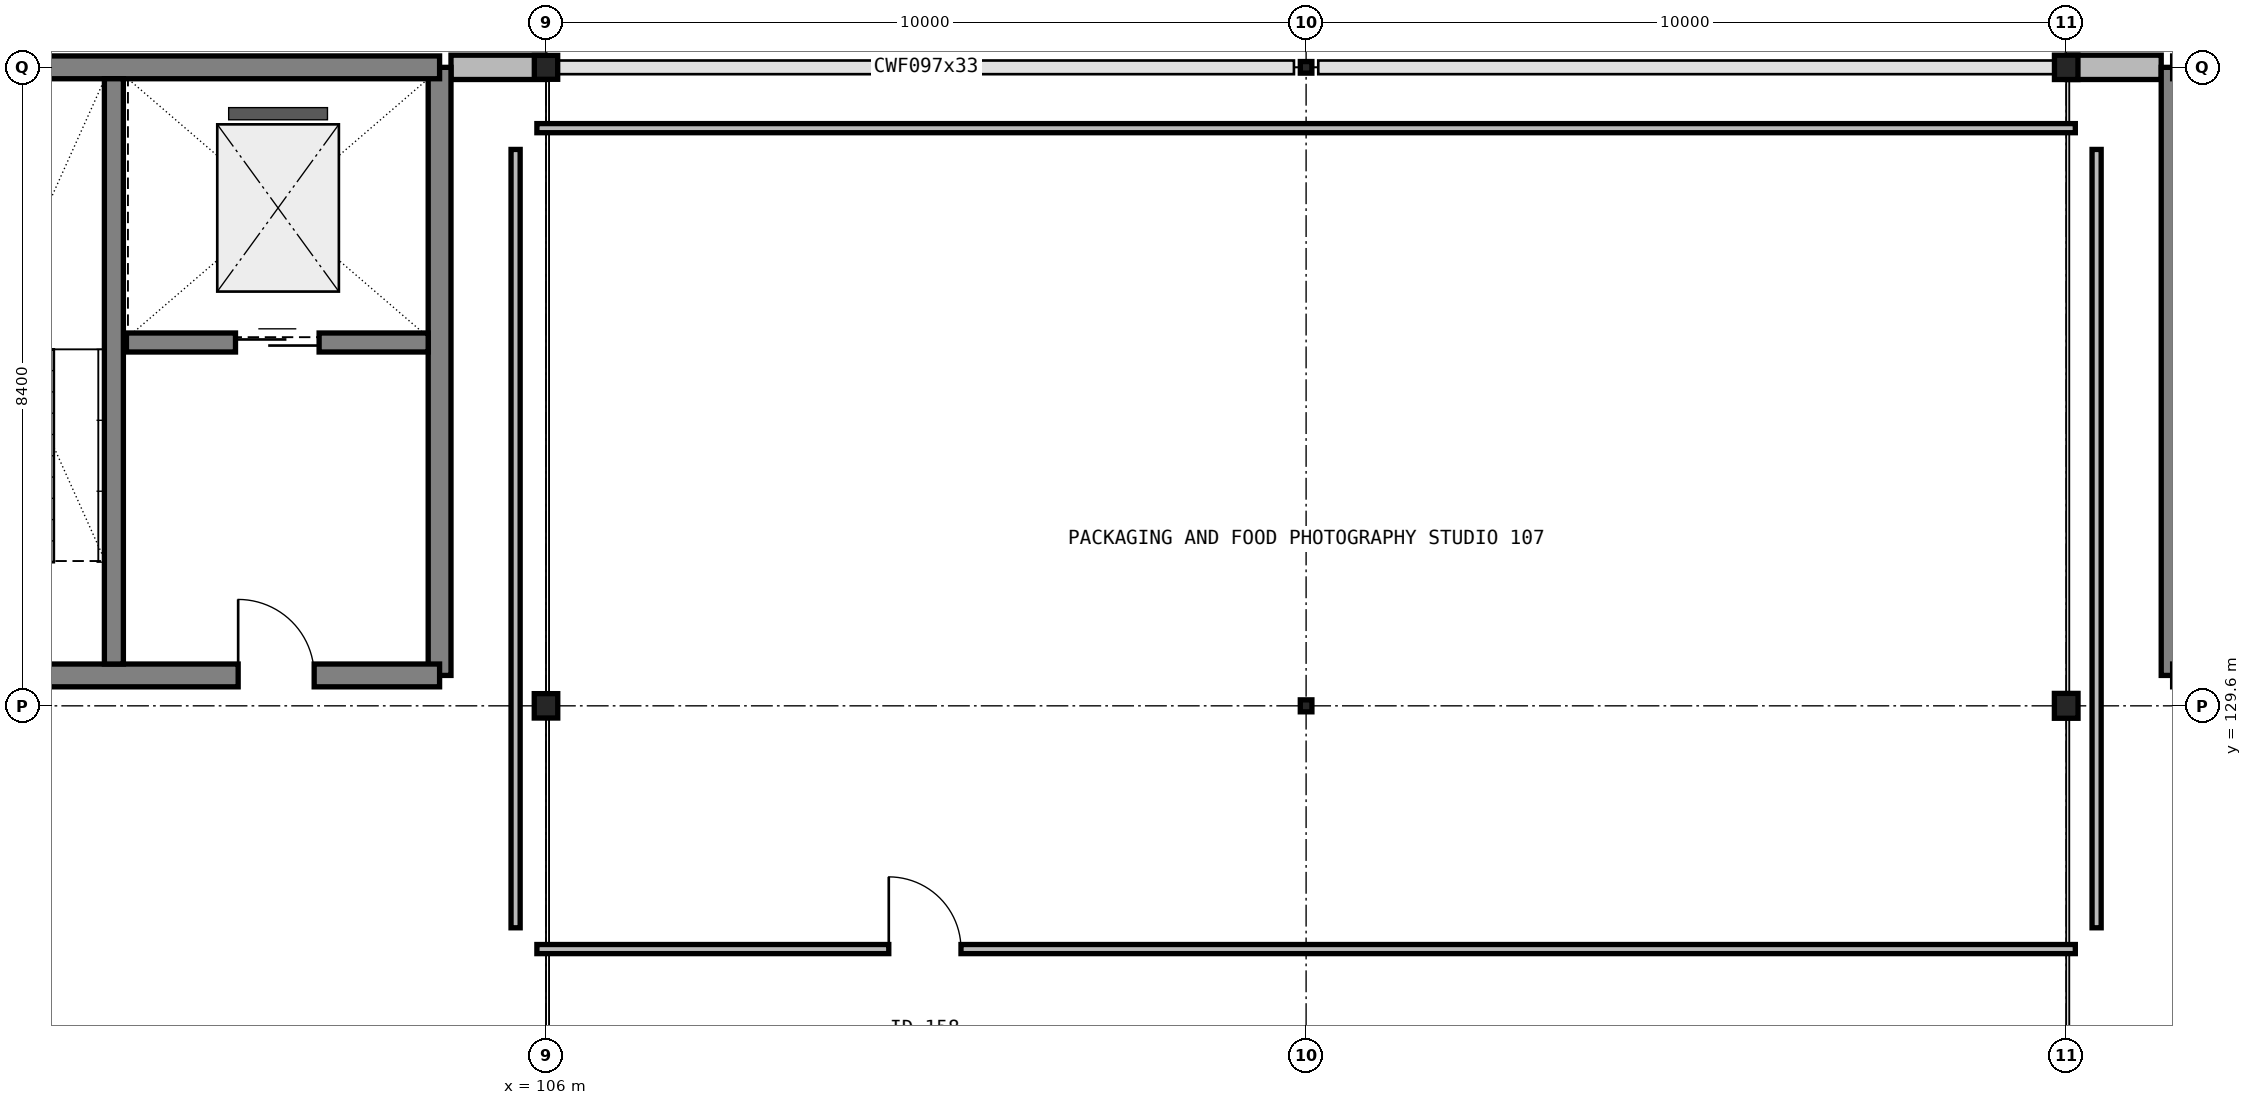
"""IFC4 building model, lengths in metres.
Left out: names, types, materials, properties, quantities, classifications, styles, units other than length and angle.
Written with IfcOpenShell. Run it as: python <this file> out.ifc"""

import sys

from ifc_helpers import new_model, si_unit, direction, frame, frame_2d, origin, origin_2d_with_axis, place, context, subcontext, project, spatial, rectangle, i_section, extrude, element, fill, save


model = new_model("IFC4")
c1 = context("Model", 3, precision=1e-05, world=origin(), true_north=direction((0.0, 1.0)))
c2 = subcontext(c1, "Body", "Model", "MODEL_VIEW")
j1 = project(units=[si_unit("LENGTHUNIT", "METRE"), si_unit("PLANEANGLEUNIT", "RADIAN")], contexts=[c1])
p1 = place(None, origin())
s1 = spatial("IfcSite", under=j1, at=p1, CompositionType="ELEMENT")
p2 = place(p1, origin())
s2 = spatial("IfcBuilding", under=s1, at=p2, CompositionType="ELEMENT")
p3 = place(p2, frame((0.0, 0.0, 4.5)))
s3 = spatial("IfcBuildingStorey", under=s2, at=p3, CompositionType="ELEMENT", Elevation=4.5)
p4 = place(p3, frame((106.0, 129.6, 0.0), z_axis=(0.0, 0.0, 1.0), x_axis=(1.0, 0.0, 0.0)))
e1 = element("IfcColumn", 1, at=p4, inside=s3, PredefinedType="COLUMN", context=c2, shape_type="SweptSolid", body=[
    extrude(i_section(OverallWidth=0.309, OverallDepth=0.321, WebThickness=0.014, FlangeThickness=0.022, FilletRadius=0.017, at=origin_2d_with_axis()), origin(), (0.0, 0.0, 1.0), 3.9),
])
p5 = place(p3, frame((106.0, 138.0, 0.0), z_axis=(0.0, 0.0, 1.0), x_axis=(1.0, 0.0, 0.0)))
e2 = element("IfcColumn", 2, at=p5, inside=s3, PredefinedType="COLUMN", context=c2, shape_type="SweptSolid", body=[
    extrude(i_section(OverallWidth=0.307, OverallDepth=0.315, WebThickness=0.012, FlangeThickness=0.019, FilletRadius=0.017, at=origin_2d_with_axis()), origin(), (0.0, 0.0, 1.0), 3.9),
])
p6 = place(p3, frame((116.0, 129.6, 0.0), z_axis=(0.0, 0.0, 1.0), x_axis=(1.0, 0.0, 0.0)))
e3 = element("IfcColumn", 3, at=p6, inside=s3, PredefinedType="COLUMN", context=c2, shape_type="SweptSolid", body=[
    extrude(i_section(OverallWidth=0.153, OverallDepth=0.158, WebThickness=0.007, FlangeThickness=0.01, FilletRadius=0.009, at=origin_2d_with_axis()), origin(), (0.0, 0.0, 1.0), 3.9),
])
p7 = place(p3, frame((116.0, 138.0, 0.0), z_axis=(0.0, 0.0, 1.0), x_axis=(1.0, 0.0, 0.0)))
e4 = element("IfcColumn", 4, at=p7, inside=s3, PredefinedType="COLUMN", context=c2, shape_type="SweptSolid", body=[
    extrude(i_section(OverallWidth=0.152, OverallDepth=0.152, WebThickness=0.006, FlangeThickness=0.007, FilletRadius=0.009, at=origin_2d_with_axis()), origin(), (0.0, 0.0, 1.0), 3.9),
])
p8 = place(p3, frame((126.0, 129.6, 0.0), z_axis=(0.0, 0.0, 1.0), x_axis=(1.0, 0.0, 0.0)))
e5 = element("IfcColumn", 5, at=p8, inside=s3, PredefinedType="COLUMN", context=c2, shape_type="SweptSolid", body=[
    extrude(i_section(OverallWidth=0.311, OverallDepth=0.327, WebThickness=0.016, FlangeThickness=0.025, FilletRadius=0.017, at=origin_2d_with_axis()), origin(), (0.0, 0.0, 1.0), 3.9),
])
p9 = place(p3, frame((126.0, 138.0, 0.0), z_axis=(0.0, 0.0, 1.0), x_axis=(1.0, 0.0, 0.0)))
e6 = element("IfcColumn", 6, at=p9, inside=s3, PredefinedType="COLUMN", context=c2, shape_type="SweptSolid", body=[
    extrude(i_section(OverallWidth=0.309, OverallDepth=0.321, WebThickness=0.014, FlangeThickness=0.022, FilletRadius=0.017, at=origin_2d_with_axis()), origin(), (0.0, 0.0, 1.0), 3.9),
])
p10 = place(p3, frame((105.99, 138.0, 0.0), z_axis=(0.0, 0.0, 1.0), x_axis=(-1.0, 0.0, 0.0)))
e7 = element("IfcWall", 7, at=p10, inside=s3, PredefinedType="SOLIDWALL", context=c2, shape_type="SweptSolid", body=[
    extrude(rectangle(XDim=1.24, YDim=0.32, at=frame_2d((0.62, 0.0), x_axis=(1.0, 0.0))), origin(), (0.0, 0.0, 1.0), 3.29),
])
p11 = place(p3, frame((127.25, 138.0, 0.0), z_axis=(0.0, 0.0, 1.0), x_axis=(-1.0, 0.0, 0.0)))
e8 = element("IfcWall", 8, at=p11, inside=s3, PredefinedType="SOLIDWALL", context=c2, shape_type="SweptSolid", body=[
    extrude(rectangle(XDim=1.239, YDim=0.32, at=frame_2d((0.62, 0.0), x_axis=(1.0, 0.0))), origin(), (0.0, 0.0, 1.0), 3.29),
])
p12 = place(p3, frame((104.6, 130.0, 0.0), z_axis=(0.0, 0.0, 1.0), x_axis=(0.0, 1.0, 0.0)))
e9 = element("IfcWall", 9, at=p12, inside=s3, PredefinedType="SHEAR", context=c2, shape_type="SweptSolid", body=[
    extrude(rectangle(XDim=8.0, YDim=0.3, at=frame_2d((4.0, 0.0), x_axis=(1.0, 0.0))), origin(), (0.0, 0.0, 1.0), 3.9),
])
p13 = place(p3, frame((97.2, 130.0, 0.0), z_axis=(0.0, 0.0, 1.0), x_axis=(1.0, 0.0, 0.0)))
e10 = element("IfcWall", 10, at=p13, inside=s3, PredefinedType="SHEAR", context=c2, shape_type="SweptSolid", body=[
    extrude(rectangle(XDim=7.4, YDim=0.3, at=frame_2d((3.7, 0.0), x_axis=(1.0, 0.0))), origin(), (0.0, 0.0, 1.0), 3.9),
])
p14 = place(p13, frame((1.1, 0.0, 0.0)))
e11 = element("IfcOpeningElement", 11, at=p14, cuts=e10, PredefinedType="OPENING", context=c2, shape_type="SweptSolid", body=[
    extrude(rectangle(XDim=1.0, YDim=2.15, at=frame_2d((0.5, 1.075), x_axis=(1.0, 0.0))), frame((0.0, 0.16, 0.0), z_axis=(0.0, -1.0, 0.0), x_axis=(1.0, 0.0, 0.0)), (0.0, 0.0, 1.0), 0.32),
])
p15 = place(p13, frame((4.75, 0.0, 0.0)))
e12 = element("IfcOpeningElement", 12, at=p15, cuts=e10, PredefinedType="OPENING", context=c2, shape_type="SweptSolid", body=[
    extrude(rectangle(XDim=1.0, YDim=2.15, at=frame_2d((0.5, 1.075), x_axis=(1.0, 0.0))), frame((0.0, 0.16, 0.0), z_axis=(0.0, -1.0, 0.0), x_axis=(1.0, 0.0, 0.0)), (0.0, 0.0, 1.0), 0.32),
])
p16 = place(p3, frame((104.6, 138.0, 0.0), z_axis=(0.0, 0.0, 1.0), x_axis=(-1.0, 0.0, 0.0)))
e13 = element("IfcWall", 13, at=p16, inside=s3, PredefinedType="SHEAR", context=c2, shape_type="SweptSolid", body=[
    extrude(rectangle(XDim=7.4, YDim=0.3, at=frame_2d((3.7, 0.0), x_axis=(1.0, 0.0))), origin(), (0.0, 0.0, 1.0), 3.9),
])
p17 = place(p3, frame((100.315, 130.15, 0.0), z_axis=(0.0, 0.0, 1.0), x_axis=(0.0, 1.0, 0.0)))
e14 = element("IfcWall", 14, at=p17, inside=s3, PredefinedType="SHEAR", context=c2, shape_type="SweptSolid", body=[
    extrude(rectangle(XDim=7.7, YDim=0.25, at=frame_2d((3.85, 0.0), x_axis=(1.0, 0.0))), origin(), (0.0, 0.0, 1.0), 3.9),
])
p18 = place(p3, frame((100.48, 134.38, 0.0), z_axis=(0.0, 0.0, 1.0), x_axis=(1.0, 0.0, 0.0)))
e15 = element("IfcWall", 15, at=p18, inside=s3, PredefinedType="SHEAR", context=c2, shape_type="SweptSolid", body=[
    extrude(rectangle(XDim=3.97, YDim=0.25, at=frame_2d((1.985, 0.0), x_axis=(1.0, 0.0))), origin(), (0.0, 0.0, 1.0), 3.65),
])
p19 = place(p18, frame((1.435, 0.0, 0.0)))
e16 = element("IfcOpeningElement", 16, at=p19, cuts=e15, PredefinedType="OPENING", context=c2, shape_type="SweptSolid", body=[
    extrude(rectangle(XDim=1.1, YDim=2.15, at=frame_2d((0.55, 1.075), x_axis=(1.0, 0.0))), frame((0.0, 0.135, 0.0), z_axis=(0.0, -1.0, 0.0), x_axis=(1.0, 0.0, 0.0)), (0.0, 0.0, 1.0), 0.27),
])
p20 = place(p3, frame((127.4, 138.0, 0.0), z_axis=(0.0, 0.0, 1.0), x_axis=(0.0, -1.0, 0.0)))
e17 = element("IfcWall", 17, at=p20, inside=s3, PredefinedType="SHEAR", context=c2, shape_type="SweptSolid", body=[
    extrude(rectangle(XDim=8.0, YDim=0.3, at=frame_2d((4.0, 0.0), x_axis=(1.0, 0.0))), origin(), (0.0, 0.0, 1.0), 3.9),
])
p21 = place(p3, frame((134.8, 138.0, 0.0), z_axis=(0.0, 0.0, 1.0), x_axis=(-1.0, 0.0, 0.0)))
e18 = element("IfcWall", 18, at=p21, inside=s3, PredefinedType="SHEAR", context=c2, shape_type="SweptSolid", body=[
    extrude(rectangle(XDim=7.4, YDim=0.3, at=frame_2d((3.7, 0.0), x_axis=(1.0, 0.0))), origin(), (0.0, 0.0, 1.0), 3.9),
])
p22 = place(p3, frame((105.88, 126.4, 0.0), z_axis=(0.0, 0.0, 1.0), x_axis=(1.0, 0.0, 0.0)))
e19 = element("IfcWall", 19, at=p22, inside=s3, PredefinedType="PARTITIONING", context=c2, shape_type="SweptSolid", body=[
    extrude(rectangle(XDim=20.24, YDim=0.12, at=frame_2d((10.12, 0.0), x_axis=(1.0, 0.0))), origin(), (0.0, 0.0, 1.0), 3.03),
])
p23 = place(p22, frame((4.63, 0.0, 0.0)))
e20 = element("IfcOpeningElement", 20, at=p23, cuts=e19, PredefinedType="OPENING", context=c2, shape_type="SweptSolid", body=[
    extrude(rectangle(XDim=0.95, YDim=2.15, at=frame_2d((0.475, 1.075), x_axis=(1.0, 0.0))), frame((0.0, 0.07, 0.0), z_axis=(0.0, -1.0, 0.0), x_axis=(1.0, 0.0, 0.0)), (0.0, 0.0, 1.0), 0.14),
])
p24 = place(p3, frame((126.4, 126.68, 0.0), z_axis=(0.0, 0.0, 1.0), x_axis=(0.0, 1.0, 0.0)))
e21 = element("IfcWall", 21, at=p24, inside=s3, PredefinedType="PARTITIONING", context=c2, shape_type="SweptSolid", body=[
    extrude(rectangle(XDim=10.24, YDim=0.12, at=frame_2d((5.12, 0.0), x_axis=(1.0, 0.0))), origin(), (0.0, 0.0, 1.0), 3.03),
])
p25 = place(p3, frame((126.12, 137.2, 0.0), z_axis=(0.0, 0.0, 1.0), x_axis=(-1.0, 0.0, 0.0)))
e22 = element("IfcWall", 22, at=p25, inside=s3, PredefinedType="PARTITIONING", context=c2, shape_type="SweptSolid", body=[
    extrude(rectangle(XDim=20.24, YDim=0.12, at=frame_2d((10.12, 0.0), x_axis=(1.0, 0.0))), origin(), (0.0, 0.0, 1.0), 3.03),
])
p26 = place(p3, frame((105.6, 136.92, 0.0), z_axis=(0.0, 0.0, 1.0), x_axis=(0.0, -1.0, 0.0)))
e23 = element("IfcWall", 23, at=p26, inside=s3, PredefinedType="PARTITIONING", context=c2, shape_type="SweptSolid", body=[
    extrude(rectangle(XDim=10.24, YDim=0.12, at=frame_2d((5.12, 0.0), x_axis=(1.0, 0.0))), origin(), (0.0, 0.0, 1.0), 3.03),
])
p27 = place(p15, origin())
e24 = element("IfcDoor", 24, at=p27, inside=s3, OperationType="SINGLE_SWING_LEFT", PredefinedType="DOOR", context=c2, shape_type="SweptSolid", body=[
    extrude(rectangle(XDim=1.0, YDim=2.15, at=frame_2d((0.5, 1.075), x_axis=(1.0, 0.0))), frame((0.0, 0.025, 0.0), z_axis=(0.0, -1.0, 0.0), x_axis=(1.0, 0.0, 0.0)), (0.0, 0.0, 1.0), 0.05),
])
fill(e12, e24)
p28 = place(p19, origin())
e25 = element("IfcDoor", 25, at=p28, inside=s3, OperationType="SLIDING_TO_LEFT", PredefinedType="DOOR", context=c2, shape_type="SweptSolid", body=[
    extrude(rectangle(XDim=1.1, YDim=2.15, at=frame_2d((0.55, 1.075), x_axis=(1.0, 0.0))), frame((0.0, 0.025, 0.0), z_axis=(0.0, -1.0, 0.0), x_axis=(1.0, 0.0, 0.0)), (0.0, 0.0, 1.0), 0.05),
])
fill(e16, e25)
p29 = place(p23, origin())
e26 = element("IfcDoor", 26, at=p29, inside=s3, OperationType="SINGLE_SWING_LEFT", PredefinedType="DOOR", context=c2, shape_type="SweptSolid", body=[
    extrude(rectangle(XDim=0.95, YDim=2.15, at=frame_2d((0.475, 1.075), x_axis=(1.0, 0.0))), frame((0.0, 0.025, 0.0), z_axis=(0.0, -1.0, 0.0), x_axis=(1.0, 0.0, 0.0)), (0.0, 0.0, 1.0), 0.05),
])
fill(e20, e26)
save(model, sys.argv[1])
